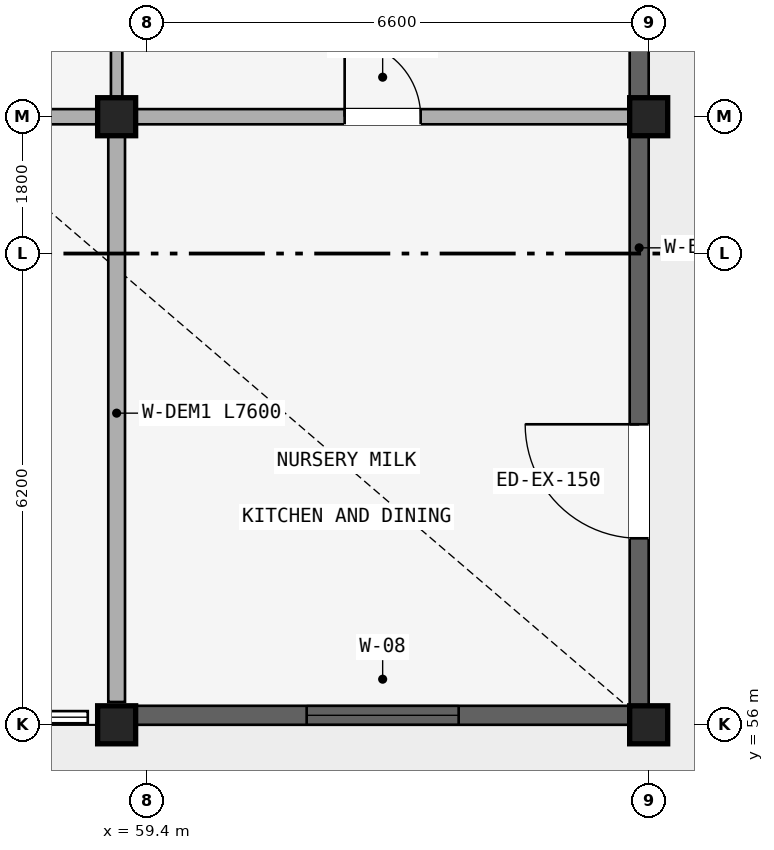
"""IFC4 building model, lengths in metres.
Left out: names, types, materials, properties, quantities, classifications, styles, units other than length and angle.
Written with IfcOpenShell. Run it as: python <this file> out.ifc"""

import sys

from ifc_helpers import new_model, si_unit, direction, frame, frame_2d, origin, origin_2d, place, context, subcontext, project, spatial, rectangle, extrude, element, fill, save


model = new_model("IFC4")
c1 = context("Model", 3, precision=1e-05, world=origin(), true_north=direction((0.0, 1.0)))
c2 = subcontext(c1, "Body", "Model", "MODEL_VIEW")
j1 = project(units=[si_unit("LENGTHUNIT", "METRE"), si_unit("PLANEANGLEUNIT", "RADIAN")], contexts=[c1])
p1 = place(None, origin())
s1 = spatial("IfcSite", under=j1, at=p1, CompositionType="ELEMENT")
p2 = place(p1, origin())
s2 = spatial("IfcBuilding", under=s1, at=p2, CompositionType="ELEMENT")
p3 = place(p2, origin())
s3 = spatial("IfcBuildingStorey", under=s2, at=p3, CompositionType="ELEMENT", Elevation=0.0)
for number, where, z_axis, x_axis in (
    (1, (59.0, 56.0, 0.0), (0.0, 0.0, 1.0), (1.0, 0.0, 0.0)),
    (2, (59.0, 64.0, 0.0), (0.0, 0.0, 1.0), (1.0, 0.0, 0.0)),
    (3, (66.0, 56.0, 0.0), (0.0, 0.0, 1.0), (1.0, 0.0, 0.0)),
    (4, (66.0, 64.0, 0.0), (0.0, 0.0, 1.0), (1.0, 0.0, 0.0)),
):
    element("IfcColumn", number, at=place(p3, frame(where, z_axis=z_axis, x_axis=x_axis)), inside=s3, PredefinedType="COLUMN", context=c2, shape_type="SweptSolid", body=[
        extrude(rectangle(XDim=0.5, YDim=0.5, at=origin_2d()), origin(), (0.0, 0.0, 1.0), 4.28),
    ])
p4 = place(p3, frame((52.15, 64.0, 0.0), z_axis=(0.0, 0.0, 1.0), x_axis=(1.0, 0.0, 0.0)))
e5 = element("IfcWall", 5, at=p4, inside=s3, PredefinedType="STANDARD", context=c2, shape_type="SweptSolid", body=[
    extrude(rectangle(XDim=6.7, YDim=0.2, at=frame_2d((3.35, 0.0))), origin(), (0.0, 0.0, 1.0), 3.672),
])
p5 = place(p4, frame((2.85, 0.0, 0.0)))
e6 = element("IfcOpeningElement", 6, at=p5, cuts=e5, PredefinedType="OPENING", context=c2, shape_type="SweptSolid", body=[
    extrude(rectangle(XDim=1.0, YDim=2.15, at=frame_2d((0.5, 1.075))), frame((0.0, 0.11, 0.0), z_axis=(0.0, -1.0, 0.0), x_axis=(1.0, 0.0, 0.0)), (0.0, 0.0, 1.0), 0.22),
])
p6 = place(p3, frame((59.15, 64.0, 0.0), z_axis=(0.0, 0.0, 1.0), x_axis=(1.0, 0.0, 0.0)))
e7 = element("IfcWall", 7, at=p6, inside=s3, PredefinedType="STANDARD", context=c2, shape_type="SweptSolid", body=[
    extrude(rectangle(XDim=6.7, YDim=0.2, at=frame_2d((3.35, 0.0))), origin(), (0.0, 0.0, 1.0), 3.672),
])
p7 = place(p6, frame((2.85, 0.0, 0.0)))
e8 = element("IfcOpeningElement", 8, at=p7, cuts=e7, PredefinedType="OPENING", context=c2, shape_type="SweptSolid", body=[
    extrude(rectangle(XDim=1.0, YDim=2.15, at=frame_2d((0.5, 1.075))), frame((0.0, 0.11, 0.0), z_axis=(0.0, -1.0, 0.0), x_axis=(1.0, 0.0, 0.0)), (0.0, 0.0, 1.0), 0.22),
])
p8 = place(p3, frame((59.0, 56.3, 0.0), z_axis=(0.0, 0.0, 1.0), x_axis=(0.0, 1.0, 0.0)))
e9 = element("IfcWall", 9, at=p8, inside=s3, PredefinedType="STANDARD", context=c2, shape_type="SweptSolid", body=[
    extrude(rectangle(XDim=7.6, YDim=0.22, at=frame_2d((3.8, 0.0))), origin(), (0.0, 0.0, 1.0), 3.672),
])
p9 = place(p3, frame((59.0, 64.1, 0.0), z_axis=(0.0, 0.0, 1.0), x_axis=(0.0, 1.0, 0.0)))
e10 = element("IfcWall", 10, at=p9, inside=s3, PredefinedType="PARTITIONING", context=c2, shape_type="SweptSolid", body=[
    extrude(rectangle(XDim=7.8, YDim=0.15, at=frame_2d((3.9, 0.0))), origin(), (0.0, 0.0, 1.0), 3.672),
])
p10 = place(p9, frame((3.0, 0.0, 0.0)))
e11 = element("IfcOpeningElement", 11, at=p10, cuts=e10, PredefinedType="OPENING", context=c2, shape_type="SweptSolid", body=[
    extrude(rectangle(XDim=1.8, YDim=2.2, at=frame_2d((0.9, 1.1))), frame((0.0, 0.085, 0.0), z_axis=(0.0, -1.0, 0.0), x_axis=(1.0, 0.0, 0.0)), (0.0, 0.0, 1.0), 0.17),
])
p11 = place(p3, frame((59.253, 56.125, 0.0), z_axis=(0.0, 0.0, 1.0), x_axis=(1.0, 0.0, 0.0)))
e12 = element("IfcWall", 12, at=p11, inside=s3, PredefinedType="STANDARD", context=c2, shape_type="SweptSolid", body=[
    extrude(rectangle(XDim=6.493, YDim=0.25, at=frame_2d((3.247, 0.0))), origin(), (0.0, 0.0, 1.0), 3.672),
])
p12 = place(p11, frame((2.247, 0.0, 0.88)))
e13 = element("IfcOpeningElement", 13, at=p12, cuts=e12, PredefinedType="OPENING", context=c2, shape_type="SweptSolid", body=[
    extrude(rectangle(XDim=2.0, YDim=1.95, at=frame_2d((1.0, 0.975))), frame((0.0, 0.135, 0.0), z_axis=(0.0, -1.0, 0.0), x_axis=(1.0, 0.0, 0.0)), (0.0, 0.0, 1.0), 0.27),
])
p13 = place(p3, frame((65.875, 56.253, 0.0), z_axis=(0.0, 0.0, 1.0), x_axis=(0.0, 1.0, 0.0)))
e14 = element("IfcWall", 14, at=p13, inside=s3, PredefinedType="STANDARD", context=c2, shape_type="SweptSolid", body=[
    extrude(rectangle(XDim=7.493, YDim=0.25, at=frame_2d((3.747, 0.0))), origin(), (0.0, 0.0, 1.0), 3.672),
])
p14 = place(p13, frame((2.2, 0.0, 0.0)))
e15 = element("IfcOpeningElement", 15, at=p14, cuts=e14, PredefinedType="OPENING", context=c2, shape_type="SweptSolid", body=[
    extrude(rectangle(XDim=1.5, YDim=2.15, at=frame_2d((0.75, 1.075))), frame((0.0, 0.135, 0.0), z_axis=(0.0, -1.0, 0.0), x_axis=(1.0, 0.0, 0.0)), (0.0, 0.0, 1.0), 0.27),
])
p15 = place(p3, frame((65.875, 64.253, 0.0), z_axis=(0.0, 0.0, 1.0), x_axis=(0.0, 1.0, 0.0)))
e16 = element("IfcWall", 16, at=p15, inside=s3, PredefinedType="STANDARD", context=c2, shape_type="SweptSolid", body=[
    extrude(rectangle(XDim=7.493, YDim=0.25, at=frame_2d((3.747, 0.0))), origin(), (0.0, 0.0, 1.0), 3.672),
])
p16 = place(p15, frame((2.747, 0.0, 0.88)))
e17 = element("IfcOpeningElement", 17, at=p16, cuts=e16, PredefinedType="OPENING", context=c2, shape_type="SweptSolid", body=[
    extrude(rectangle(XDim=2.0, YDim=1.95, at=frame_2d((1.0, 0.975))), frame((0.0, 0.135, 0.0), z_axis=(0.0, -1.0, 0.0), x_axis=(1.0, 0.0, 0.0)), (0.0, 0.0, 1.0), 0.27),
])
p17 = place(p12, origin())
e18 = element("IfcWindow", 18, at=p17, inside=s3, PartitioningType="TRIPLE_PANEL_VERTICAL", PredefinedType="WINDOW", context=c2, shape_type="SweptSolid", body=[
    extrude(rectangle(XDim=2.0, YDim=1.95, at=frame_2d((1.0, 0.975))), frame((0.0, 0.03, 0.0), z_axis=(0.0, -1.0, 0.0), x_axis=(1.0, 0.0, 0.0)), (0.0, 0.0, 1.0), 0.06),
])
fill(e13, e18)
p18 = place(p7, frame((1.0, 0.0, 0.0), z_axis=(0.0, 0.0, 1.0), x_axis=(-1.0, 0.0, 0.0)))
e19 = element("IfcDoor", 19, at=p18, inside=s3, OperationType="SINGLE_SWING_RIGHT", PredefinedType="DOOR", context=c2, shape_type="SweptSolid", body=[
    extrude(rectangle(XDim=1.0, YDim=2.15, at=frame_2d((0.5, 1.075))), frame((0.0, 0.025, 0.0), z_axis=(0.0, -1.0, 0.0), x_axis=(1.0, 0.0, 0.0)), (0.0, 0.0, 1.0), 0.05),
])
fill(e8, e19)
p19 = place(p14, frame((1.5, 0.0, 0.0), z_axis=(0.0, 0.0, 1.0), x_axis=(-1.0, 0.0, 0.0)))
e20 = element("IfcDoor", 20, at=p19, inside=s3, OperationType="SINGLE_SWING_LEFT", PredefinedType="DOOR", context=c2, shape_type="SweptSolid", body=[
    extrude(rectangle(XDim=1.5, YDim=2.15, at=frame_2d((0.75, 1.075))), frame((0.0, 0.025, 0.0), z_axis=(0.0, -1.0, 0.0), x_axis=(1.0, 0.0, 0.0)), (0.0, 0.0, 1.0), 0.05),
])
fill(e15, e20)
save(model, sys.argv[1])
